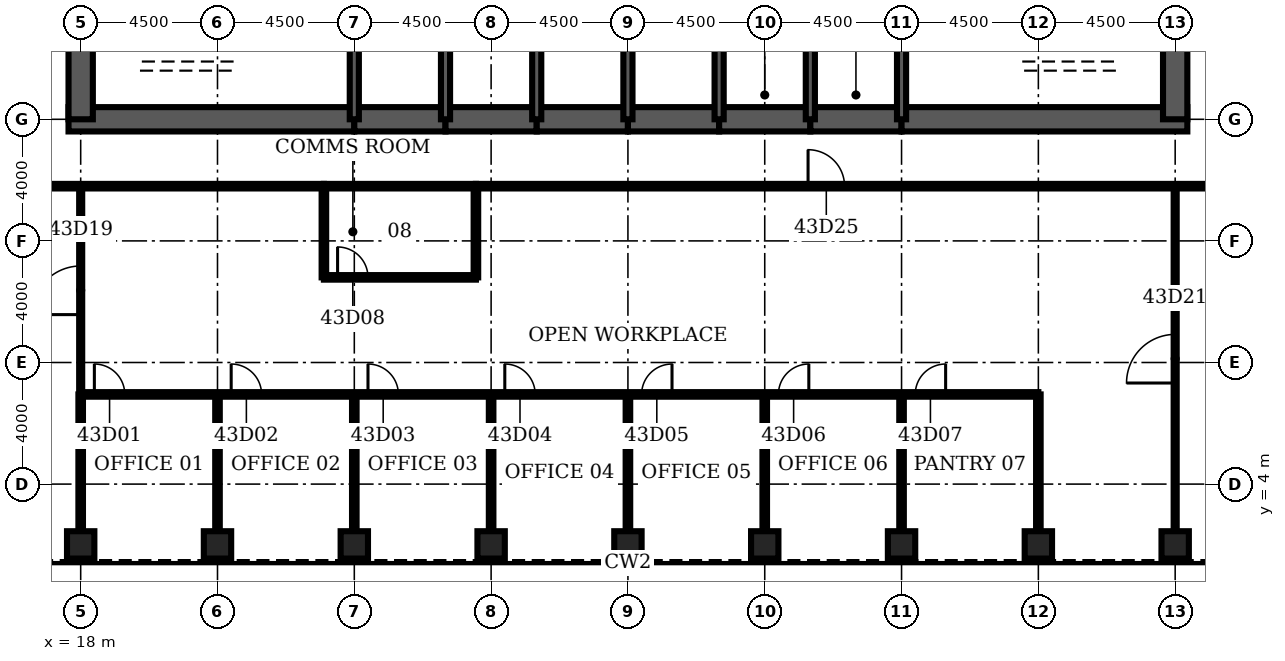
"""IFC4 building model, lengths in metres.
Left out: names, types, materials, properties, quantities, classifications, styles, units other than length and angle.
Written with IfcOpenShell. Run it as: python <this file> out.ifc"""

import sys

from ifc_helpers import new_model, si_unit, direction, frame, frame_2d, origin, origin_2d, place, context, subcontext, project, spatial, rectangle, hollow_rectangle, extrude, element, fill, save


model = new_model("IFC4")
c1 = context("Model", 3, precision=1e-05, world=origin(), true_north=direction((0.0, 1.0)))
c2 = subcontext(c1, "Body", "Model", "MODEL_VIEW")
j1 = project(units=[si_unit("LENGTHUNIT", "METRE"), si_unit("PLANEANGLEUNIT", "RADIAN")], contexts=[c1])
p1 = place(None, origin())
s1 = spatial("IfcSite", under=j1, at=p1, CompositionType="ELEMENT")
p2 = place(p1, origin())
s2 = spatial("IfcBuilding", under=s1, at=p2, CompositionType="ELEMENT")
p3 = place(p2, frame((0.0, 0.0, 194.2)))
s3 = spatial("IfcBuildingStorey", under=s2, at=p3, CompositionType="ELEMENT", Elevation=194.2)
for number, where, z_axis, x_axis in (
    (1, (18.0, 2.0, 0.0), (0.0, 0.0, 1.0), (0.0, 1.0, 0.0)),
    (2, (22.5, 2.0, 0.0), (0.0, 0.0, 1.0), (0.0, 1.0, 0.0)),
    (3, (27.0, 2.0, 0.0), (0.0, 0.0, 1.0), (0.0, 1.0, 0.0)),
    (4, (31.5, 2.0, 0.0), (0.0, 0.0, 1.0), (0.0, 1.0, 0.0)),
    (5, (36.0, 2.0, 0.0), (0.0, 0.0, 1.0), (0.0, 1.0, 0.0)),
    (6, (40.5, 2.0, 0.0), (0.0, 0.0, 1.0), (0.0, 1.0, 0.0)),
    (7, (45.0, 2.0, 0.0), (0.0, 0.0, 1.0), (0.0, 1.0, 0.0)),
    (8, (49.5, 2.0, 0.0), (0.0, 0.0, 1.0), (0.0, 1.0, 0.0)),
    (9, (54.0, 2.0, 0.0), (0.0, 0.0, 1.0), (0.0, 1.0, 0.0)),
):
    element("IfcColumn", number, at=place(p3, frame(where, z_axis=z_axis, x_axis=x_axis)), inside=s3, PredefinedType="COLUMN", context=c2, shape_type="SweptSolid", body=[
        extrude(hollow_rectangle(XDim=0.9, YDim=0.9, WallThickness=0.09, at=origin_2d()), origin(), (0.0, 0.0, 1.0), 4.2),
    ])
p4 = place(p3, frame((17.6, 16.0, 0.0), z_axis=(0.0, 0.0, 1.0), x_axis=(1.0, 0.0, 0.0)))
e10 = element("IfcWall", 10, at=p4, inside=s3, PredefinedType="SHEAR", context=c2, shape_type="SweptSolid", body=[
    extrude(rectangle(XDim=9.4, YDim=0.8, at=frame_2d((4.7, 0.0))), origin(), (0.0, 0.0, 1.0), 4.2),
])
for number, where, z_axis, x_axis in (
    (11, (27.0, 16.0, 0.0), (0.0, 0.0, 1.0), (1.0, 0.0, 0.0)),
    (12, (30.0, 16.0, 0.0), (0.0, 0.0, 1.0), (1.0, 0.0, 0.0)),
    (13, (33.0, 16.0, 0.0), (0.0, 0.0, 1.0), (1.0, 0.0, 0.0)),
    (14, (36.0, 16.0, 0.0), (0.0, 0.0, 1.0), (1.0, 0.0, 0.0)),
    (15, (39.0, 16.0, 0.0), (0.0, 0.0, 1.0), (1.0, 0.0, 0.0)),
    (16, (42.0, 16.0, 0.0), (0.0, 0.0, 1.0), (1.0, 0.0, 0.0)),
):
    element("IfcWall", number, at=place(p3, frame(where, z_axis=z_axis, x_axis=x_axis)), inside=s3, PredefinedType="SHEAR", context=c2, shape_type="SweptSolid", body=[
        extrude(rectangle(XDim=3.0, YDim=0.8, at=frame_2d((1.5, 0.0))), origin(), (0.0, 0.0, 1.0), 4.2),
    ])
p5 = place(p3, frame((45.0, 16.0, 0.0), z_axis=(0.0, 0.0, 1.0), x_axis=(1.0, 0.0, 0.0)))
e17 = element("IfcWall", 17, at=p5, inside=s3, PredefinedType="SHEAR", context=c2, shape_type="SweptSolid", body=[
    extrude(rectangle(XDim=9.4, YDim=0.8, at=frame_2d((4.7, 0.0))), origin(), (0.0, 0.0, 1.0), 4.2),
])
for number, where, z_axis, x_axis in (
    (18, (18.0, 19.2, 0.0), (0.0, 0.0, 1.0), (0.0, -1.0, 0.0)),
    (19, (54.0, 16.0, 0.0), (0.0, 0.0, 1.0), (0.0, 1.0, 0.0)),
):
    element("IfcWall", number, at=place(p3, frame(where, z_axis=z_axis, x_axis=x_axis)), inside=s3, PredefinedType="SHEAR", context=c2, shape_type="SweptSolid", body=[
        extrude(rectangle(XDim=3.2, YDim=0.8, at=frame_2d((1.6, 0.0))), origin(), (0.0, 0.0, 1.0), 4.2),
    ])
for number, where, z_axis, x_axis in (
    (20, (27.0, 16.0, 0.0), (0.0, 0.0, 1.0), (0.0, 1.0, 0.0)),
    (21, (30.0, 16.0, 0.0), (0.0, 0.0, 1.0), (0.0, 1.0, 0.0)),
    (22, (33.0, 16.0, 0.0), (0.0, 0.0, 1.0), (0.0, 1.0, 0.0)),
    (23, (36.0, 16.0, 0.0), (0.0, 0.0, 1.0), (0.0, 1.0, 0.0)),
    (24, (39.0, 16.0, 0.0), (0.0, 0.0, 1.0), (0.0, 1.0, 0.0)),
    (25, (42.0, 16.0, 0.0), (0.0, 0.0, 1.0), (0.0, 1.0, 0.0)),
    (26, (45.0, 16.0, 0.0), (0.0, 0.0, 1.0), (0.0, 1.0, 0.0)),
):
    element("IfcWall", number, at=place(p3, frame(where, z_axis=z_axis, x_axis=x_axis)), inside=s3, PredefinedType="SOLIDWALL", context=c2, shape_type="SweptSolid", body=[
        extrude(rectangle(XDim=3.2, YDim=0.3, at=frame_2d((1.6, 0.0))), origin(), (0.0, 0.0, 1.0), 4.2),
    ])
p6 = place(p3, frame((39.15, 17.35, 0.0), z_axis=(0.0, 0.0, 1.0), x_axis=(1.0, 0.0, 0.0)))
e27 = element("IfcWall", 27, at=p6, inside=s3, PredefinedType="SOLIDWALL", context=c2, shape_type="SweptSolid", body=[
    extrude(rectangle(XDim=2.7, YDim=0.3, at=frame_2d((1.35, 0.0))), origin(), (0.0, 0.0, 1.0), 4.04),
])
p7 = place(p6, frame((0.85, 0.0, 0.0)))
e28 = element("IfcOpeningElement", 28, at=p7, cuts=e27, PredefinedType="OPENING", context=c2, shape_type="SweptSolid", body=[
    extrude(rectangle(XDim=1.0, YDim=2.1, at=frame_2d((0.5, 1.05))), frame((0.0, 0.16, 0.0), z_axis=(0.0, -1.0, 0.0), x_axis=(1.0, 0.0, 0.0)), (0.0, 0.0, 1.0), 0.32),
])
p8 = place(p3, frame((42.15, 17.35, 0.0), z_axis=(0.0, 0.0, 1.0), x_axis=(1.0, 0.0, 0.0)))
e29 = element("IfcWall", 29, at=p8, inside=s3, PredefinedType="SOLIDWALL", context=c2, shape_type="SweptSolid", body=[
    extrude(rectangle(XDim=2.7, YDim=0.3, at=frame_2d((1.35, 0.0))), origin(), (0.0, 0.0, 1.0), 4.04),
])
p9 = place(p8, frame((0.85, 0.0, 0.0)))
e30 = element("IfcOpeningElement", 30, at=p9, cuts=e29, PredefinedType="OPENING", context=c2, shape_type="SweptSolid", body=[
    extrude(rectangle(XDim=1.0, YDim=2.1, at=frame_2d((0.5, 1.05))), frame((0.0, 0.16, 0.0), z_axis=(0.0, -1.0, 0.0), x_axis=(1.0, 0.0, 0.0)), (0.0, 0.0, 1.0), 0.32),
])
p10 = place(p3, frame((18.0, 6.95, 0.0), z_axis=(0.0, 0.0, 1.0), x_axis=(1.0, 0.0, 0.0)))
e31 = element("IfcWall", 31, at=p10, inside=s3, PredefinedType="PARTITIONING", context=c2, shape_type="SweptSolid", body=[
    extrude(rectangle(XDim=31.5, YDim=0.15, at=frame_2d((15.75, 0.0))), origin(), (0.0, 0.0, 1.0), 3.0),
])
p11 = place(p10, frame((0.45, 0.0, 0.0)))
e32 = element("IfcOpeningElement", 32, at=p11, cuts=e31, PredefinedType="OPENING", context=c2, shape_type="SweptSolid", body=[
    extrude(rectangle(XDim=1.0, YDim=2.1, at=frame_2d((0.5, 1.05))), frame((0.0, 0.085, 0.0), z_axis=(0.0, -1.0, 0.0), x_axis=(1.0, 0.0, 0.0)), (0.0, 0.0, 1.0), 0.17),
])
p12 = place(p10, frame((4.95, 0.0, 0.0)))
e33 = element("IfcOpeningElement", 33, at=p12, cuts=e31, PredefinedType="OPENING", context=c2, shape_type="SweptSolid", body=[
    extrude(rectangle(XDim=1.0, YDim=2.1, at=frame_2d((0.5, 1.05))), frame((0.0, 0.085, 0.0), z_axis=(0.0, -1.0, 0.0), x_axis=(1.0, 0.0, 0.0)), (0.0, 0.0, 1.0), 0.17),
])
p13 = place(p10, frame((9.45, 0.0, 0.0)))
e34 = element("IfcOpeningElement", 34, at=p13, cuts=e31, PredefinedType="OPENING", context=c2, shape_type="SweptSolid", body=[
    extrude(rectangle(XDim=1.0, YDim=2.1, at=frame_2d((0.5, 1.05))), frame((0.0, 0.085, 0.0), z_axis=(0.0, -1.0, 0.0), x_axis=(1.0, 0.0, 0.0)), (0.0, 0.0, 1.0), 0.17),
])
p14 = place(p10, frame((13.95, 0.0, 0.0)))
e35 = element("IfcOpeningElement", 35, at=p14, cuts=e31, PredefinedType="OPENING", context=c2, shape_type="SweptSolid", body=[
    extrude(rectangle(XDim=1.0, YDim=2.1, at=frame_2d((0.5, 1.05))), frame((0.0, 0.085, 0.0), z_axis=(0.0, -1.0, 0.0), x_axis=(1.0, 0.0, 0.0)), (0.0, 0.0, 1.0), 0.17),
])
p15 = place(p10, frame((18.45, 0.0, 0.0)))
e36 = element("IfcOpeningElement", 36, at=p15, cuts=e31, PredefinedType="OPENING", context=c2, shape_type="SweptSolid", body=[
    extrude(rectangle(XDim=1.0, YDim=2.1, at=frame_2d((0.5, 1.05))), frame((0.0, 0.085, 0.0), z_axis=(0.0, -1.0, 0.0), x_axis=(1.0, 0.0, 0.0)), (0.0, 0.0, 1.0), 0.17),
])
p16 = place(p10, frame((22.95, 0.0, 0.0)))
e37 = element("IfcOpeningElement", 37, at=p16, cuts=e31, PredefinedType="OPENING", context=c2, shape_type="SweptSolid", body=[
    extrude(rectangle(XDim=1.0, YDim=2.1, at=frame_2d((0.5, 1.05))), frame((0.0, 0.085, 0.0), z_axis=(0.0, -1.0, 0.0), x_axis=(1.0, 0.0, 0.0)), (0.0, 0.0, 1.0), 0.17),
])
p17 = place(p10, frame((27.45, 0.0, 0.0)))
e38 = element("IfcOpeningElement", 38, at=p17, cuts=e31, PredefinedType="OPENING", context=c2, shape_type="SweptSolid", body=[
    extrude(rectangle(XDim=1.0, YDim=2.1, at=frame_2d((0.5, 1.05))), frame((0.0, 0.085, 0.0), z_axis=(0.0, -1.0, 0.0), x_axis=(1.0, 0.0, 0.0)), (0.0, 0.0, 1.0), 0.17),
])
p18 = place(p3, frame((26.0, 10.8, 0.0), z_axis=(0.0, 0.0, 1.0), x_axis=(1.0, 0.0, 0.0)))
e39 = element("IfcWall", 39, at=p18, inside=s3, PredefinedType="PARTITIONING", context=c2, shape_type="SweptSolid", body=[
    extrude(rectangle(XDim=5.0, YDim=0.15, at=frame_2d((2.5, 0.0))), origin(), (0.0, 0.0, 1.0), 3.0),
])
p19 = place(p18, frame((0.45, 0.0, 0.0)))
e40 = element("IfcOpeningElement", 40, at=p19, cuts=e39, PredefinedType="OPENING", context=c2, shape_type="SweptSolid", body=[
    extrude(rectangle(XDim=1.0, YDim=2.1, at=frame_2d((0.5, 1.05))), frame((0.0, 0.085, 0.0), z_axis=(0.0, -1.0, 0.0), x_axis=(1.0, 0.0, 0.0)), (0.0, 0.0, 1.0), 0.17),
])
p20 = place(p3, frame((15.2, 13.8, 0.0), z_axis=(0.0, 0.0, 1.0), x_axis=(1.0, 0.0, 0.0)))
e41 = element("IfcWall", 41, at=p20, inside=s3, PredefinedType="PARTITIONING", context=c2, shape_type="SweptSolid", body=[
    extrude(rectangle(XDim=10.8, YDim=0.15, at=frame_2d((5.4, 0.0))), origin(), (0.0, 0.0, 1.0), 3.0),
])
p21 = place(p3, frame((26.0, 13.8, 0.0), z_axis=(0.0, 0.0, 1.0), x_axis=(1.0, 0.0, 0.0)))
e42 = element("IfcWall", 42, at=p21, inside=s3, PredefinedType="PARTITIONING", context=c2, shape_type="SweptSolid", body=[
    extrude(rectangle(XDim=5.0, YDim=0.15, at=frame_2d((2.5, 0.0))), origin(), (0.0, 0.0, 1.0), 3.0),
])
p22 = place(p3, frame((31.0, 13.8, 0.0), z_axis=(0.0, 0.0, 1.0), x_axis=(1.0, 0.0, 0.0)))
e43 = element("IfcWall", 43, at=p22, inside=s3, PredefinedType="PARTITIONING", context=c2, shape_type="SweptSolid", body=[
    extrude(rectangle(XDim=25.8, YDim=0.15, at=frame_2d((12.9, 0.0))), origin(), (0.0, 0.0, 1.0), 3.0),
])
p23 = place(p22, frame((10.925, 0.0, 0.0)))
e44 = element("IfcOpeningElement", 44, at=p23, cuts=e43, PredefinedType="OPENING", context=c2, shape_type="SweptSolid", body=[
    extrude(rectangle(XDim=1.2, YDim=2.1, at=frame_2d((0.6, 1.05))), frame((0.0, 0.085, 0.0), z_axis=(0.0, -1.0, 0.0), x_axis=(1.0, 0.0, 0.0)), (0.0, 0.0, 1.0), 0.17),
])
p24 = place(p3, frame((18.0, 2.45, 0.0), z_axis=(0.0, 0.0, 1.0), x_axis=(0.0, 1.0, 0.0)))
e45 = element("IfcWall", 45, at=p24, inside=s3, PredefinedType="PARTITIONING", context=c2, shape_type="SweptSolid", body=[
    extrude(rectangle(XDim=4.5, YDim=0.15, at=frame_2d((2.25, 0.0))), origin(), (0.0, 0.0, 1.0), 3.0),
])
p25 = place(p3, frame((18.0, 6.95, 0.0), z_axis=(0.0, 0.0, 1.0), x_axis=(0.0, 1.0, 0.0)))
e46 = element("IfcWall", 46, at=p25, inside=s3, PredefinedType="PARTITIONING", context=c2, shape_type="SweptSolid", body=[
    extrude(rectangle(XDim=6.85, YDim=0.1, at=frame_2d((3.425, 0.0))), origin(), (0.0, 0.0, 1.0), 3.0),
])
p26 = place(p25, frame((2.625, 0.0, 0.0)))
e47 = element("IfcOpeningElement", 47, at=p26, cuts=e46, PredefinedType="OPENING", context=c2, shape_type="SweptSolid", body=[
    extrude(rectangle(XDim=1.6, YDim=2.1, at=frame_2d((0.8, 1.05))), frame((0.0, 0.06, 0.0), z_axis=(0.0, -1.0, 0.0), x_axis=(1.0, 0.0, 0.0)), (0.0, 0.0, 1.0), 0.12),
])
p27 = place(p3, frame((22.5, 2.45, 0.0), z_axis=(0.0, 0.0, 1.0), x_axis=(0.0, 1.0, 0.0)))
e48 = element("IfcWall", 48, at=p27, inside=s3, PredefinedType="PARTITIONING", context=c2, shape_type="SweptSolid", body=[
    extrude(rectangle(XDim=4.5, YDim=0.15, at=frame_2d((2.25, 0.0))), origin(), (0.0, 0.0, 1.0), 3.0),
])
p28 = place(p3, frame((26.0, 10.8, 0.0), z_axis=(0.0, 0.0, 1.0), x_axis=(0.0, 1.0, 0.0)))
e49 = element("IfcWall", 49, at=p28, inside=s3, PredefinedType="PARTITIONING", context=c2, shape_type="SweptSolid", body=[
    extrude(rectangle(XDim=3.0, YDim=0.15, at=frame_2d((1.5, 0.0))), origin(), (0.0, 0.0, 1.0), 3.0),
])
p29 = place(p3, frame((27.0, 2.45, 0.0), z_axis=(0.0, 0.0, 1.0), x_axis=(0.0, 1.0, 0.0)))
e50 = element("IfcWall", 50, at=p29, inside=s3, PredefinedType="PARTITIONING", context=c2, shape_type="SweptSolid", body=[
    extrude(rectangle(XDim=4.5, YDim=0.15, at=frame_2d((2.25, 0.0))), origin(), (0.0, 0.0, 1.0), 3.0),
])
p30 = place(p3, frame((31.0, 10.8, 0.0), z_axis=(0.0, 0.0, 1.0), x_axis=(0.0, 1.0, 0.0)))
e51 = element("IfcWall", 51, at=p30, inside=s3, PredefinedType="PARTITIONING", context=c2, shape_type="SweptSolid", body=[
    extrude(rectangle(XDim=3.0, YDim=0.15, at=frame_2d((1.5, 0.0))), origin(), (0.0, 0.0, 1.0), 3.0),
])
for number, where, z_axis, x_axis in (
    (52, (31.5, 2.45, 0.0), (0.0, 0.0, 1.0), (0.0, 1.0, 0.0)),
    (53, (36.0, 2.45, 0.0), (0.0, 0.0, 1.0), (0.0, 1.0, 0.0)),
    (54, (40.5, 2.45, 0.0), (0.0, 0.0, 1.0), (0.0, 1.0, 0.0)),
    (55, (45.0, 2.45, 0.0), (0.0, 0.0, 1.0), (0.0, 1.0, 0.0)),
    (56, (49.5, 2.45, 0.0), (0.0, 0.0, 1.0), (0.0, 1.0, 0.0)),
):
    element("IfcWall", number, at=place(p3, frame(where, z_axis=z_axis, x_axis=x_axis)), inside=s3, PredefinedType="PARTITIONING", context=c2, shape_type="SweptSolid", body=[
        extrude(rectangle(XDim=4.5, YDim=0.15, at=frame_2d((2.25, 0.0))), origin(), (0.0, 0.0, 1.0), 3.0),
    ])
p31 = place(p3, frame((54.0, 2.45, 0.0), z_axis=(0.0, 0.0, 1.0), x_axis=(0.0, 1.0, 0.0)))
e57 = element("IfcWall", 57, at=p31, inside=s3, PredefinedType="PARTITIONING", context=c2, shape_type="SweptSolid", body=[
    extrude(rectangle(XDim=11.35, YDim=0.1, at=frame_2d((5.675, 0.0))), origin(), (0.0, 0.0, 1.0), 3.0),
])
p32 = place(p31, frame((4.875, 0.0, 0.0)))
e58 = element("IfcOpeningElement", 58, at=p32, cuts=e57, PredefinedType="OPENING", context=c2, shape_type="SweptSolid", body=[
    extrude(rectangle(XDim=1.6, YDim=2.1, at=frame_2d((0.8, 1.05))), frame((0.0, 0.06, 0.0), z_axis=(0.0, -1.0, 0.0), x_axis=(1.0, 0.0, 0.0)), (0.0, 0.0, 1.0), 0.12),
])
p33 = place(p7, origin())
e59 = element("IfcDoor", 59, at=p33, inside=s3, OperationType="SINGLE_SWING_LEFT", PredefinedType="DOOR", context=c2, shape_type="SweptSolid", body=[
    extrude(rectangle(XDim=1.0, YDim=2.1, at=frame_2d((0.5, 1.05))), frame((0.0, 0.025, 0.0), z_axis=(0.0, -1.0, 0.0), x_axis=(1.0, 0.0, 0.0)), (0.0, 0.0, 1.0), 0.05),
])
fill(e28, e59)
p34 = place(p9, origin())
e60 = element("IfcDoor", 60, at=p34, inside=s3, OperationType="SINGLE_SWING_LEFT", PredefinedType="DOOR", context=c2, shape_type="SweptSolid", body=[
    extrude(rectangle(XDim=1.0, YDim=2.1, at=frame_2d((0.5, 1.05))), frame((0.0, 0.025, 0.0), z_axis=(0.0, -1.0, 0.0), x_axis=(1.0, 0.0, 0.0)), (0.0, 0.0, 1.0), 0.05),
])
fill(e30, e60)
p35 = place(p11, origin())
e61 = element("IfcDoor", 61, at=p35, inside=s3, OperationType="SINGLE_SWING_LEFT", PredefinedType="DOOR", context=c2, shape_type="SweptSolid", body=[
    extrude(rectangle(XDim=1.0, YDim=2.1, at=frame_2d((0.5, 1.05))), frame((0.0, 0.025, 0.0), z_axis=(0.0, -1.0, 0.0), x_axis=(1.0, 0.0, 0.0)), (0.0, 0.0, 1.0), 0.05),
])
fill(e32, e61)
p36 = place(p12, origin())
e62 = element("IfcDoor", 62, at=p36, inside=s3, OperationType="SINGLE_SWING_LEFT", PredefinedType="DOOR", context=c2, shape_type="SweptSolid", body=[
    extrude(rectangle(XDim=1.0, YDim=2.1, at=frame_2d((0.5, 1.05))), frame((0.0, 0.025, 0.0), z_axis=(0.0, -1.0, 0.0), x_axis=(1.0, 0.0, 0.0)), (0.0, 0.0, 1.0), 0.05),
])
fill(e33, e62)
p37 = place(p13, origin())
e63 = element("IfcDoor", 63, at=p37, inside=s3, OperationType="SINGLE_SWING_LEFT", PredefinedType="DOOR", context=c2, shape_type="SweptSolid", body=[
    extrude(rectangle(XDim=1.0, YDim=2.1, at=frame_2d((0.5, 1.05))), frame((0.0, 0.025, 0.0), z_axis=(0.0, -1.0, 0.0), x_axis=(1.0, 0.0, 0.0)), (0.0, 0.0, 1.0), 0.05),
])
fill(e34, e63)
p38 = place(p14, origin())
e64 = element("IfcDoor", 64, at=p38, inside=s3, OperationType="SINGLE_SWING_LEFT", PredefinedType="DOOR", context=c2, shape_type="SweptSolid", body=[
    extrude(rectangle(XDim=1.0, YDim=2.1, at=frame_2d((0.5, 1.05))), frame((0.0, 0.025, 0.0), z_axis=(0.0, -1.0, 0.0), x_axis=(1.0, 0.0, 0.0)), (0.0, 0.0, 1.0), 0.05),
])
fill(e35, e64)
p39 = place(p15, origin())
e65 = element("IfcDoor", 65, at=p39, inside=s3, OperationType="SINGLE_SWING_RIGHT", PredefinedType="DOOR", context=c2, shape_type="SweptSolid", body=[
    extrude(rectangle(XDim=1.0, YDim=2.1, at=frame_2d((0.5, 1.05))), frame((0.0, 0.025, 0.0), z_axis=(0.0, -1.0, 0.0), x_axis=(1.0, 0.0, 0.0)), (0.0, 0.0, 1.0), 0.05),
])
fill(e36, e65)
p40 = place(p16, origin())
e66 = element("IfcDoor", 66, at=p40, inside=s3, OperationType="SINGLE_SWING_RIGHT", PredefinedType="DOOR", context=c2, shape_type="SweptSolid", body=[
    extrude(rectangle(XDim=1.0, YDim=2.1, at=frame_2d((0.5, 1.05))), frame((0.0, 0.025, 0.0), z_axis=(0.0, -1.0, 0.0), x_axis=(1.0, 0.0, 0.0)), (0.0, 0.0, 1.0), 0.05),
])
fill(e37, e66)
p41 = place(p17, origin())
e67 = element("IfcDoor", 67, at=p41, inside=s3, OperationType="SINGLE_SWING_RIGHT", PredefinedType="DOOR", context=c2, shape_type="SweptSolid", body=[
    extrude(rectangle(XDim=1.0, YDim=2.1, at=frame_2d((0.5, 1.05))), frame((0.0, 0.025, 0.0), z_axis=(0.0, -1.0, 0.0), x_axis=(1.0, 0.0, 0.0)), (0.0, 0.0, 1.0), 0.05),
])
fill(e38, e67)
p42 = place(p19, origin())
e68 = element("IfcDoor", 68, at=p42, inside=s3, OperationType="SINGLE_SWING_LEFT", PredefinedType="DOOR", context=c2, shape_type="SweptSolid", body=[
    extrude(rectangle(XDim=1.0, YDim=2.1, at=frame_2d((0.5, 1.05))), frame((0.0, 0.025, 0.0), z_axis=(0.0, -1.0, 0.0), x_axis=(1.0, 0.0, 0.0)), (0.0, 0.0, 1.0), 0.05),
])
fill(e40, e68)
p43 = place(p26, origin())
e69 = element("IfcDoor", 69, at=p43, inside=s3, OperationType="SINGLE_SWING_LEFT", PredefinedType="DOOR", context=c2, shape_type="SweptSolid", body=[
    extrude(rectangle(XDim=1.6, YDim=2.1, at=frame_2d((0.8, 1.05))), frame((0.0, 0.025, 0.0), z_axis=(0.0, -1.0, 0.0), x_axis=(1.0, 0.0, 0.0)), (0.0, 0.0, 1.0), 0.05),
])
fill(e47, e69)
p44 = place(p32, origin())
e70 = element("IfcDoor", 70, at=p44, inside=s3, OperationType="SINGLE_SWING_LEFT", PredefinedType="DOOR", context=c2, shape_type="SweptSolid", body=[
    extrude(rectangle(XDim=1.6, YDim=2.1, at=frame_2d((0.8, 1.05))), frame((0.0, 0.025, 0.0), z_axis=(0.0, -1.0, 0.0), x_axis=(1.0, 0.0, 0.0)), (0.0, 0.0, 1.0), 0.05),
])
fill(e58, e70)
p45 = place(p23, origin())
e71 = element("IfcDoor", 71, at=p45, inside=s3, OperationType="SINGLE_SWING_LEFT", PredefinedType="DOOR", context=c2, shape_type="SweptSolid", body=[
    extrude(rectangle(XDim=1.2, YDim=2.1, at=frame_2d((0.6, 1.05))), frame((0.0, 0.025, 0.0), z_axis=(0.0, -1.0, 0.0), x_axis=(1.0, 0.0, 0.0)), (0.0, 0.0, 1.0), 0.05),
])
fill(e44, e71)
save(model, sys.argv[1])
